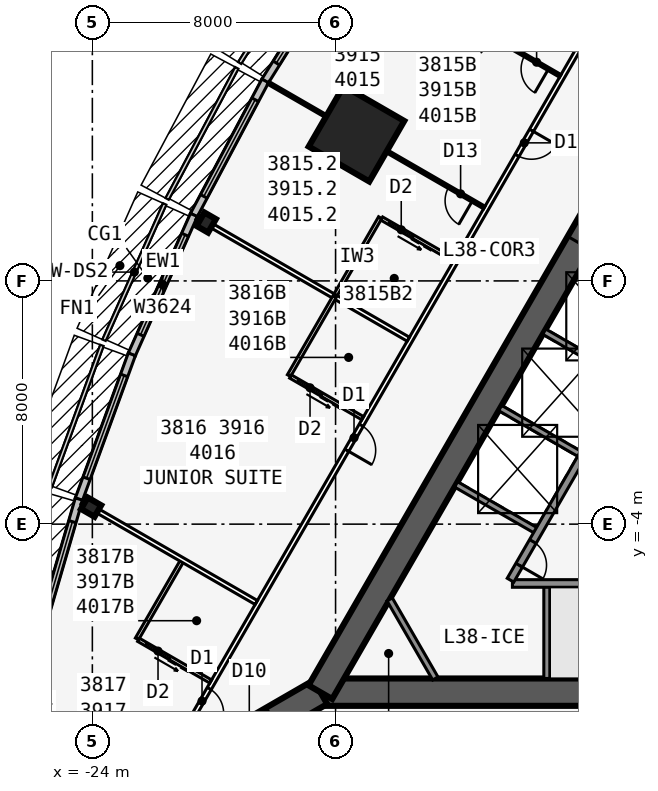
"""IFC4 building model, lengths in metres.
Left out: names, types, materials, properties, quantities, classifications, styles, units other than length and angle.
Written with IfcOpenShell. Run it as: python <this file> out.ifc"""

import sys

from ifc_helpers import new_model, si_unit, direction, frame, frame_2d, origin, origin_2d, place, context, subcontext, project, spatial, rectangle, i_section, extrude, element, fill, save


model = new_model("IFC4")
c1 = context("Model", 3, precision=1e-05, world=origin(), true_north=direction((0.0, 1.0)))
c2 = subcontext(c1, "Body", "Model", "MODEL_VIEW")
j1 = project(units=[si_unit("LENGTHUNIT", "METRE"), si_unit("PLANEANGLEUNIT", "RADIAN")], contexts=[c1])
p1 = place(None, origin())
s1 = spatial("IfcSite", under=j1, at=p1, CompositionType="ELEMENT")
p2 = place(p1, origin())
s2 = spatial("IfcBuilding", under=s1, at=p2, CompositionType="ELEMENT")
p3 = place(p2, frame((0.0, 0.0, 145.3)))
s3 = spatial("IfcBuildingStorey", under=s2, at=p3, CompositionType="ELEMENT", Elevation=145.3)
p4 = place(p3, frame((-16.5, -9.526, 0.0), z_axis=(0.0, 0.0, 1.0), x_axis=(1.0, 0.0, 0.0)))
e1 = element("IfcWall", 1, at=p4, inside=s3, PredefinedType="SHEAR", context=c2, shape_type="SweptSolid", body=[
    extrude(rectangle(XDim=33.0, YDim=0.9, at=frame_2d((16.5, 0.0))), origin(), (0.0, 0.0, 1.0), 3.4),
])
p5 = place(p4, frame((14.05, 0.0, 0.0)))
e2 = element("IfcOpeningElement", 2, at=p5, cuts=e1, PredefinedType="OPENING", context=c2, shape_type="SweptSolid", body=[
    extrude(rectangle(XDim=1.8, YDim=2.13, at=frame_2d((0.9, 1.065))), frame((0.0, 0.46, 0.0), z_axis=(0.0, -1.0, 0.0), x_axis=(1.0, 0.0, 0.0)), (0.0, 0.0, 1.0), 0.92),
])
p6 = place(p3, frame((-10.183, -5.951, 0.0), z_axis=(0.0, 0.0, 1.0), x_axis=(1.0, 0.0, 0.0)))
e3 = element("IfcWall", 3, at=p6, inside=s3, PredefinedType="SOLIDWALL", context=c2, shape_type="SweptSolid", body=[
    extrude(rectangle(XDim=7.633, YDim=0.25, at=frame_2d((3.816, 0.0))), origin(), (0.0, 0.0, 1.0), 3.235),
])
p7 = place(p3, frame((-9.05, -5.951, 0.0), z_axis=(0.0, 0.0, 1.0), x_axis=(0.0, -1.0, 0.0)))
e4 = element("IfcWall", 4, at=p7, inside=s3, PredefinedType="SOLIDWALL", context=c2, shape_type="SweptSolid", body=[
    extrude(rectangle(XDim=3.125, YDim=0.2, at=frame_2d((1.562, 0.0))), origin(), (0.0, 0.0, 1.0), 3.235),
])
p8 = place(p3, frame((0.0, 19.052, 0.0), z_axis=(0.0, 0.0, 1.0), x_axis=(-0.499999749417, -0.866025548458, 0.0)))
e5 = element("IfcWall", 5, at=p8, inside=s3, PredefinedType="SHEAR", context=c2, shape_type="SweptSolid", body=[
    extrude(rectangle(XDim=33.0, YDim=0.9, at=frame_2d((16.5, 0.0))), origin(), (0.0, 0.0, 1.0), 3.4),
])
p9 = place(p8, frame((14.15, 0.0, 0.0)))
e6 = element("IfcOpeningElement", 6, at=p9, cuts=e5, PredefinedType="OPENING", context=c2, shape_type="SweptSolid", body=[
    extrude(rectangle(XDim=1.8, YDim=2.13, at=frame_2d((0.9, 1.065))), frame((0.0, 0.46, 0.0), z_axis=(0.0, -1.0, 0.0), x_axis=(1.0, 0.0, 0.0)), (0.0, 0.0, 1.0), 0.92),
])
p10 = place(p8, frame((12.6, 0.0, 0.0)))
e7 = element("IfcOpeningElement", 7, at=p10, cuts=e5, PredefinedType="OPENING", context=c2, shape_type="SweptSolid", body=[
    extrude(rectangle(XDim=1.0, YDim=2.13, at=frame_2d((0.5, 1.065))), frame((0.0, 0.46, 0.0), z_axis=(0.0, -1.0, 0.0), x_axis=(1.0, 0.0, 0.0)), (0.0, 0.0, 1.0), 0.92),
])
p11 = place(p3, frame((-4.929, 3.365, 0.0), z_axis=(0.0, 0.0, 1.0), x_axis=(-0.499991433582, -0.866030349552, 0.0)))
e8 = element("IfcWall", 8, at=p11, inside=s3, PredefinedType="SOLIDWALL", context=c2, shape_type="SweptSolid", body=[
    extrude(rectangle(XDim=10.633, YDim=0.25, at=frame_2d((5.316, 0.0))), origin(), (0.0, 0.0, 1.0), 3.235),
])
p12 = place(p11, frame((9.164, 0.0, 0.0)))
e9 = element("IfcOpeningElement", 9, at=p12, cuts=e8, PredefinedType="OPENING", context=c2, shape_type="SweptSolid", body=[
    extrude(rectangle(XDim=0.9, YDim=2.13, at=frame_2d((0.45, 1.065))), frame((0.0, 0.135, 0.0), z_axis=(0.0, -1.0, 0.0), x_axis=(1.0, 0.0, 0.0)), (0.0, 0.0, 1.0), 0.27),
])
for number, where, z_axis, x_axis in (
    (10, (-6.429, 0.767, 0.0), (0.0, 0.0, 1.0), (-0.866, 0.5, 0.0)),
    (11, (-7.879, -1.744, 0.0), (0.0, 0.0, 1.0), (-0.866, 0.5, 0.0)),
    (12, (-9.329, -4.256, 0.0), (0.0, 0.0, 1.0), (-0.866, 0.5, 0.0)),
):
    element("IfcWall", number, at=place(p3, frame(where, z_axis=z_axis, x_axis=x_axis)), inside=s3, PredefinedType="SOLIDWALL", context=c2, shape_type="SweptSolid", body=[
        extrude(rectangle(XDim=3.125, YDim=0.2, at=frame_2d((1.562, 0.0))), origin(), (0.0, 0.0, 1.0), 3.235),
    ])
p13 = place(p3, frame((-16.5, -9.526, 0.0), z_axis=(0.0, 0.0, 1.0), x_axis=(-0.866031398331, -0.499989616998, 0.0)))
e13 = element("IfcWall", 13, at=p13, inside=s3, PredefinedType="SHEAR", context=c2, shape_type="SweptSolid", body=[
    extrude(rectangle(XDim=4.746, YDim=0.9, at=frame_2d((2.373, 0.0))), origin(), (0.0, 0.0, 1.0), 3.4),
])
p14 = place(p13, frame((1.8, 0.0, 0.0)))
e14 = element("IfcOpeningElement", 14, at=p14, cuts=e13, PredefinedType="OPENING", context=c2, shape_type="SweptSolid", body=[
    extrude(rectangle(XDim=1.8, YDim=2.13, at=frame_2d((0.9, 1.065))), frame((0.0, 0.46, 0.0), z_axis=(0.0, -1.0, 0.0), x_axis=(1.0, 0.0, 0.0)), (0.0, 0.0, 1.0), 0.92),
])
for number, where, z_axis, x_axis in (
    (15, (-20.254, 5.92, 0.0), (0.0, 0.0, 1.0), (-0.866, 0.5, 0.0)),
    (16, (-24.041, -3.44, 0.0), (0.0, 0.0, 1.0), (-0.5, -0.866, 0.0)),
):
    element("IfcColumn", number, at=place(p3, frame(where, z_axis=z_axis, x_axis=x_axis)), inside=s3, PredefinedType="COLUMN", context=c2, shape_type="SweptSolid", body=[
        extrude(i_section(OverallWidth=0.437, OverallDepth=0.513, WebThickness=0.061, FlangeThickness=0.097, at=origin_2d()), origin(), (0.0, 0.0, 1.0), 3.4),
    ])
p15 = place(p3, frame((-15.312, 8.84, 0.0), z_axis=(0.0, 0.0, 1.0), x_axis=(-0.866025403784, 0.5, 0.0)))
e17 = element("IfcColumn", 17, at=p15, inside=s3, PredefinedType="COLUMN", context=c2, shape_type="SweptSolid", body=[
    extrude(rectangle(XDim=2.3, YDim=2.3, at=origin_2d()), origin(), (0.0, 0.0, 1.0), 3.4),
])
p16 = place(p3, frame((-15.667, 14.814, 0.0), z_axis=(0.0, 0.0, 1.0), x_axis=(-0.529990167382, -0.84800378683, 0.0)))
e18 = element("IfcWall", 18, at=p16, inside=s3, PredefinedType="STANDARD", context=c2, shape_type="SweptSolid", body=[
    extrude(rectangle(XDim=5.003, YDim=0.25, at=frame_2d((2.501, 0.0))), origin(), (0.0, 0.0, 1.0), 3.235),
])
p17 = place(p16, frame((0.701, 0.0, 0.45)))
e19 = element("IfcOpeningElement", 19, at=p17, cuts=e18, PredefinedType="OPENING", context=c2, shape_type="SweptSolid", body=[
    extrude(rectangle(XDim=3.6, YDim=2.4, at=frame_2d((1.8, 1.2))), frame((0.0, 0.135, 0.0), z_axis=(0.0, -1.0, 0.0), x_axis=(1.0, 0.0, 0.0)), (0.0, 0.0, 1.0), 0.27),
])
p18 = place(p3, frame((-18.314, 10.579, 0.0), z_axis=(0.0, 0.0, 1.0), x_axis=(-0.469404966864, -0.882982999317, 0.0)))
e20 = element("IfcWall", 20, at=p18, inside=s3, PredefinedType="STANDARD", context=c2, shape_type="SweptSolid", body=[
    extrude(rectangle(XDim=5.003, YDim=0.25, at=frame_2d((2.501, 0.0))), origin(), (0.0, 0.0, 1.0), 3.235),
])
p19 = place(p18, frame((0.701, 0.0, 0.45)))
e21 = element("IfcOpeningElement", 21, at=p19, cuts=e20, PredefinedType="OPENING", context=c2, shape_type="SweptSolid", body=[
    extrude(rectangle(XDim=3.6, YDim=2.4, at=frame_2d((1.8, 1.2))), frame((0.0, 0.135, 0.0), z_axis=(0.0, -1.0, 0.0), x_axis=(1.0, 0.0, 0.0)), (0.0, 0.0, 1.0), 0.27),
])
p20 = place(p3, frame((-20.659, 6.169, 0.0), z_axis=(0.0, 0.0, 1.0), x_axis=(-0.406832200364, -0.913502906808, 0.0)))
e22 = element("IfcWall", 22, at=p20, inside=s3, PredefinedType="STANDARD", context=c2, shape_type="SweptSolid", body=[
    extrude(rectangle(XDim=5.028, YDim=0.25, at=frame_2d((2.514, 0.0))), origin(), (0.0, 0.0, 1.0), 3.235),
])
p21 = place(p20, frame((0.714, 0.0, 0.45)))
e23 = element("IfcOpeningElement", 23, at=p21, cuts=e22, PredefinedType="OPENING", context=c2, shape_type="SweptSolid", body=[
    extrude(rectangle(XDim=3.6, YDim=2.4, at=frame_2d((1.8, 1.2))), frame((0.0, 0.135, 0.0), z_axis=(0.0, -1.0, 0.0), x_axis=(1.0, 0.0, 0.0)), (0.0, 0.0, 1.0), 0.27),
])
p22 = place(p3, frame((-22.701, 1.584, 0.0), z_axis=(0.0, 0.0, 1.0), x_axis=(-0.343225593282, -0.939252996863, 0.0)))
e24 = element("IfcWall", 24, at=p22, inside=s3, PredefinedType="STANDARD", context=c2, shape_type="SweptSolid", body=[
    extrude(rectangle(XDim=5.076, YDim=0.25, at=frame_2d((2.538, 0.0))), origin(), (0.0, 0.0, 1.0), 3.235),
])
p23 = place(p22, frame((0.738, 0.0, 0.45)))
e25 = element("IfcOpeningElement", 25, at=p23, cuts=e24, PredefinedType="OPENING", context=c2, shape_type="SweptSolid", body=[
    extrude(rectangle(XDim=3.6, YDim=2.4, at=frame_2d((1.8, 1.2))), frame((0.0, 0.135, 0.0), z_axis=(0.0, -1.0, 0.0), x_axis=(1.0, 0.0, 0.0)), (0.0, 0.0, 1.0), 0.27),
])
p24 = place(p3, frame((-24.441, -3.175, 0.0), z_axis=(0.0, 0.0, 1.0), x_axis=(-0.279528287117, -0.960137457191, 0.0)))
e26 = element("IfcWall", 26, at=p24, inside=s3, PredefinedType="STANDARD", context=c2, shape_type="SweptSolid", body=[
    extrude(rectangle(XDim=5.148, YDim=0.25, at=frame_2d((2.574, 0.0))), origin(), (0.0, 0.0, 1.0), 3.235),
])
p25 = place(p24, frame((0.774, 0.0, 0.45)))
e27 = element("IfcOpeningElement", 27, at=p25, cuts=e26, PredefinedType="OPENING", context=c2, shape_type="SweptSolid", body=[
    extrude(rectangle(XDim=3.6, YDim=2.4, at=frame_2d((1.8, 1.2))), frame((0.0, 0.135, 0.0), z_axis=(0.0, -1.0, 0.0), x_axis=(1.0, 0.0, 0.0)), (0.0, 0.0, 1.0), 0.27),
])
p26 = place(p3, frame((-0.5, 24.636, 0.0), z_axis=(0.0, 0.0, 1.0), x_axis=(-0.500001915564, -0.86602429783, 0.0)))
e28 = element("IfcWall", 28, at=p26, inside=s3, PredefinedType="PARTITIONING", context=c2, shape_type="SweptSolid", body=[
    extrude(rectangle(XDim=42.172, YDim=0.15, at=frame_2d((21.086, 0.0))), origin(), (0.0, 0.0, 1.0), 3.235),
])
p27 = place(p26, frame((1.911, 0.0, 0.0)))
e29 = element("IfcOpeningElement", 29, at=p27, cuts=e28, PredefinedType="OPENING", context=c2, shape_type="SweptSolid", body=[
    extrude(rectangle(XDim=0.95, YDim=2.13, at=frame_2d((0.475, 1.065))), frame((0.0, 0.085, 0.0), z_axis=(0.0, -1.0, 0.0), x_axis=(1.0, 0.0, 0.0)), (0.0, 0.0, 1.0), 0.17),
])
p28 = place(p26, frame((9.311, 0.0, 0.0)))
e30 = element("IfcOpeningElement", 30, at=p28, cuts=e28, PredefinedType="OPENING", context=c2, shape_type="SweptSolid", body=[
    extrude(rectangle(XDim=0.95, YDim=2.13, at=frame_2d((0.475, 1.065))), frame((0.0, 0.085, 0.0), z_axis=(0.0, -1.0, 0.0), x_axis=(1.0, 0.0, 0.0)), (0.0, 0.0, 1.0), 0.17),
])
p29 = place(p26, frame((18.111, 0.0, 0.0)))
e31 = element("IfcOpeningElement", 31, at=p29, cuts=e28, PredefinedType="OPENING", context=c2, shape_type="SweptSolid", body=[
    extrude(rectangle(XDim=0.95, YDim=2.13, at=frame_2d((0.475, 1.065))), frame((0.0, 0.085, 0.0), z_axis=(0.0, -1.0, 0.0), x_axis=(1.0, 0.0, 0.0)), (0.0, 0.0, 1.0), 0.17),
])
p30 = place(p26, frame((29.311, 0.0, 0.0)))
e32 = element("IfcOpeningElement", 32, at=p30, cuts=e28, PredefinedType="OPENING", context=c2, shape_type="SweptSolid", body=[
    extrude(rectangle(XDim=0.95, YDim=2.13, at=frame_2d((0.475, 1.065))), frame((0.0, 0.085, 0.0), z_axis=(0.0, -1.0, 0.0), x_axis=(1.0, 0.0, 0.0)), (0.0, 0.0, 1.0), 0.17),
])
p31 = place(p26, frame((39.311, 0.0, 0.0)))
e33 = element("IfcOpeningElement", 33, at=p31, cuts=e28, PredefinedType="OPENING", context=c2, shape_type="SweptSolid", body=[
    extrude(rectangle(XDim=0.95, YDim=2.13, at=frame_2d((0.475, 1.065))), frame((0.0, 0.085, 0.0), z_axis=(0.0, -1.0, 0.0), x_axis=(1.0, 0.0, 0.0)), (0.0, 0.0, 1.0), 0.17),
])
p32 = place(p3, frame((-8.608, 10.743, 0.0), z_axis=(0.0, 0.0, 1.0), x_axis=(-0.866041663918, 0.499971835565, 0.0)))
e34 = element("IfcWall", 34, at=p32, inside=s3, PredefinedType="PARTITIONING", context=c2, shape_type="SweptSolid", body=[
    extrude(rectangle(XDim=8.022, YDim=0.1, at=frame_2d((4.011, 0.0))), origin(), (0.0, 0.0, 1.0), 2.389),
])
p33 = place(p32, frame((0.45, 0.0, 0.0)))
e35 = element("IfcOpeningElement", 35, at=p33, cuts=e34, PredefinedType="OPENING", context=c2, shape_type="SweptSolid", body=[
    extrude(rectangle(XDim=0.9, YDim=2.13, at=frame_2d((0.45, 1.065))), frame((0.0, 0.06, 0.0), z_axis=(0.0, -1.0, 0.0), x_axis=(1.0, 0.0, 0.0)), (0.0, 0.0, 1.0), 0.12),
])
p34 = place(p3, frame((-11.108, 6.413, 0.0), z_axis=(0.0, 0.0, 1.0), x_axis=(-0.866026407964, 0.499998260706, 0.0)))
e36 = element("IfcWall", 36, at=p34, inside=s3, PredefinedType="PARTITIONING", context=c2, shape_type="SweptSolid", body=[
    extrude(rectangle(XDim=8.199, YDim=0.1, at=frame_2d((4.099, 0.0))), origin(), (0.0, 0.0, 1.0), 2.389),
])
p35 = place(p34, frame((0.45, 0.0, 0.0)))
e37 = element("IfcOpeningElement", 37, at=p35, cuts=e36, PredefinedType="OPENING", context=c2, shape_type="SweptSolid", body=[
    extrude(rectangle(XDim=0.9, YDim=2.13, at=frame_2d((0.45, 1.065))), frame((0.0, 0.06, 0.0), z_axis=(0.0, -1.0, 0.0), x_axis=(1.0, 0.0, 0.0)), (0.0, 0.0, 1.0), 0.12),
])
p36 = place(p3, frame((-13.608, 2.083, 0.0), z_axis=(0.0, 0.0, 1.0), x_axis=(-0.866028486751, 0.499994660107, 0.0)))
e38 = element("IfcWall", 38, at=p36, inside=s3, PredefinedType="PARTITIONING", context=c2, shape_type="SweptSolid", body=[
    extrude(rectangle(XDim=8.022, YDim=0.15, at=frame_2d((4.011, 0.0))), origin(), (0.0, 0.0, 1.0), 2.389),
])
p37 = place(p3, frame((-18.608, -6.577, 0.0), z_axis=(0.0, 0.0, 1.0), x_axis=(-0.866031967744, 0.499988630717, 0.0)))
e39 = element("IfcWall", 39, at=p37, inside=s3, PredefinedType="PARTITIONING", context=c2, shape_type="SweptSolid", body=[
    extrude(rectangle(XDim=6.616, YDim=0.15, at=frame_2d((3.308, 0.0))), origin(), (0.0, 0.0, 1.0), 2.389),
])
p38 = place(p3, frame((-14.533, 6.081, 0.0), z_axis=(0.0, 0.0, 1.0), x_axis=(-0.499990139034, -0.866031096941, 0.0)))
e40 = element("IfcWall", 40, at=p38, inside=s3, PredefinedType="PLUMBINGWALL", context=c2, shape_type="SweptSolid", body=[
    extrude(rectangle(XDim=3.0, YDim=0.12, at=frame_2d((1.5, 0.0))), origin(), (0.0, 0.0, 1.0), 3.235),
])
p39 = place(p3, frame((-12.108, 4.681, 0.0), z_axis=(0.0, 0.0, 1.0), x_axis=(-0.866035715982, 0.499982138324, 0.0)))
e41 = element("IfcWall", 41, at=p39, inside=s3, PredefinedType="PLUMBINGWALL", context=c2, shape_type="SweptSolid", body=[
    extrude(rectangle(XDim=2.74, YDim=0.12, at=frame_2d((1.37, 0.0))), origin(), (0.0, 0.0, 1.0), 3.235),
])
p40 = place(p39, frame((1.55, 0.0, 0.0)))
e42 = element("IfcOpeningElement", 42, at=p40, cuts=e41, PredefinedType="OPENING", context=c2, shape_type="SweptSolid", body=[
    extrude(rectangle(XDim=0.9, YDim=2.13, at=frame_2d((0.45, 1.065))), frame((0.0, 0.07, 0.0), z_axis=(0.0, -1.0, 0.0), x_axis=(1.0, 0.0, 0.0)), (0.0, 0.0, 1.0), 0.14),
])
p41 = place(p3, frame((-16.033, 3.483, 0.0), z_axis=(0.0, 0.0, 1.0), x_axis=(-0.50002537861, -0.866010750942, 0.0)))
e43 = element("IfcWall", 43, at=p41, inside=s3, PredefinedType="PLUMBINGWALL", context=c2, shape_type="SweptSolid", body=[
    extrude(rectangle(XDim=3.0, YDim=0.12, at=frame_2d((1.5, 0.0))), origin(), (0.0, 0.0, 1.0), 3.235),
])
p42 = place(p3, frame((-15.108, -0.515, 0.0), z_axis=(0.0, 0.0, 1.0), x_axis=(-0.865997131366, 0.500048966069, 0.0)))
e44 = element("IfcWall", 44, at=p42, inside=s3, PredefinedType="PLUMBINGWALL", context=c2, shape_type="SweptSolid", body=[
    extrude(rectangle(XDim=2.74, YDim=0.12, at=frame_2d((1.37, 0.0))), origin(), (0.0, 0.0, 1.0), 3.235),
])
p43 = place(p42, frame((1.55, 0.0, 0.0)))
e45 = element("IfcOpeningElement", 45, at=p43, cuts=e44, PredefinedType="OPENING", context=c2, shape_type="SweptSolid", body=[
    extrude(rectangle(XDim=0.9, YDim=2.13, at=frame_2d((0.45, 1.065))), frame((0.0, 0.07, 0.0), z_axis=(0.0, -1.0, 0.0), x_axis=(1.0, 0.0, 0.0)), (0.0, 0.0, 1.0), 0.14),
])
p44 = place(p3, frame((-21.033, -5.177, 0.0), z_axis=(0.0, 0.0, 1.0), x_axis=(-0.499990139034, -0.866031096941, 0.0)))
e46 = element("IfcWall", 46, at=p44, inside=s3, PredefinedType="PLUMBINGWALL", context=c2, shape_type="SweptSolid", body=[
    extrude(rectangle(XDim=3.0, YDim=0.12, at=frame_2d((1.5, 0.0))), origin(), (0.0, 0.0, 1.0), 3.235),
])
p45 = place(p3, frame((-20.108, -9.175, 0.0), z_axis=(0.0, 0.0, 1.0), x_axis=(-0.866035715982, 0.499982138324, 0.0)))
e47 = element("IfcWall", 47, at=p45, inside=s3, PredefinedType="PLUMBINGWALL", context=c2, shape_type="SweptSolid", body=[
    extrude(rectangle(XDim=2.74, YDim=0.12, at=frame_2d((1.37, 0.0))), origin(), (0.0, 0.0, 1.0), 3.235),
])
p46 = place(p45, frame((1.55, 0.0, 0.0)))
e48 = element("IfcOpeningElement", 48, at=p46, cuts=e47, PredefinedType="OPENING", context=c2, shape_type="SweptSolid", body=[
    extrude(rectangle(XDim=0.9, YDim=2.13, at=frame_2d((0.45, 1.065))), frame((0.0, 0.07, 0.0), z_axis=(0.0, -1.0, 0.0), x_axis=(1.0, 0.0, 0.0)), (0.0, 0.0, 1.0), 0.14),
])
p47 = place(p3, frame((-12.719, -9.076, 0.0), z_axis=(0.0, 0.0, 1.0), x_axis=(-0.499952404951, 0.866052881055, 0.0)))
e49 = element("IfcWall", 49, at=p47, inside=s3, PredefinedType="SOLIDWALL", context=c2, shape_type="SweptSolid", body=[
    extrude(rectangle(XDim=3.002, YDim=0.2, at=frame_2d((1.501, 0.0))), origin(), (0.0, 0.0, 1.0), 3.235),
])
p48 = place(p17, origin())
e50 = element("IfcWindow", 50, at=p48, inside=s3, PartitioningType="SINGLE_PANEL", PredefinedType="WINDOW", context=c2, shape_type="SweptSolid", body=[
    extrude(rectangle(XDim=3.6, YDim=2.4, at=frame_2d((1.8, 1.2))), frame((0.0, 0.03, 0.0), z_axis=(0.0, -1.0, 0.0), x_axis=(1.0, 0.0, 0.0)), (0.0, 0.0, 1.0), 0.06),
])
fill(e19, e50)
p49 = place(p19, origin())
e51 = element("IfcWindow", 51, at=p49, inside=s3, PartitioningType="SINGLE_PANEL", PredefinedType="WINDOW", context=c2, shape_type="SweptSolid", body=[
    extrude(rectangle(XDim=3.6, YDim=2.4, at=frame_2d((1.8, 1.2))), frame((0.0, 0.03, 0.0), z_axis=(0.0, -1.0, 0.0), x_axis=(1.0, 0.0, 0.0)), (0.0, 0.0, 1.0), 0.06),
])
fill(e21, e51)
p50 = place(p21, origin())
e52 = element("IfcWindow", 52, at=p50, inside=s3, PartitioningType="SINGLE_PANEL", PredefinedType="WINDOW", context=c2, shape_type="SweptSolid", body=[
    extrude(rectangle(XDim=3.6, YDim=2.4, at=frame_2d((1.8, 1.2))), frame((0.0, 0.03, 0.0), z_axis=(0.0, -1.0, 0.0), x_axis=(1.0, 0.0, 0.0)), (0.0, 0.0, 1.0), 0.06),
])
fill(e23, e52)
p51 = place(p23, origin())
e53 = element("IfcWindow", 53, at=p51, inside=s3, PartitioningType="SINGLE_PANEL", PredefinedType="WINDOW", context=c2, shape_type="SweptSolid", body=[
    extrude(rectangle(XDim=3.6, YDim=2.4, at=frame_2d((1.8, 1.2))), frame((0.0, 0.03, 0.0), z_axis=(0.0, -1.0, 0.0), x_axis=(1.0, 0.0, 0.0)), (0.0, 0.0, 1.0), 0.06),
])
fill(e25, e53)
p52 = place(p25, origin())
e54 = element("IfcWindow", 54, at=p52, inside=s3, PartitioningType="SINGLE_PANEL", PredefinedType="WINDOW", context=c2, shape_type="SweptSolid", body=[
    extrude(rectangle(XDim=3.6, YDim=2.4, at=frame_2d((1.8, 1.2))), frame((0.0, 0.03, 0.0), z_axis=(0.0, -1.0, 0.0), x_axis=(1.0, 0.0, 0.0)), (0.0, 0.0, 1.0), 0.06),
])
fill(e27, e54)
p53 = place(p33, origin())
e55 = element("IfcDoor", 55, at=p53, inside=s3, OperationType="SINGLE_SWING_LEFT", PredefinedType="DOOR", context=c2, shape_type="SweptSolid", body=[
    extrude(rectangle(XDim=0.9, YDim=2.13, at=frame_2d((0.45, 1.065))), frame((0.0, 0.025, 0.0), z_axis=(0.0, -1.0, 0.0), x_axis=(1.0, 0.0, 0.0)), (0.0, 0.0, 1.0), 0.05),
])
fill(e35, e55)
p54 = place(p35, origin())
e56 = element("IfcDoor", 56, at=p54, inside=s3, OperationType="SINGLE_SWING_LEFT", PredefinedType="DOOR", context=c2, shape_type="SweptSolid", body=[
    extrude(rectangle(XDim=0.9, YDim=2.13, at=frame_2d((0.45, 1.065))), frame((0.0, 0.025, 0.0), z_axis=(0.0, -1.0, 0.0), x_axis=(1.0, 0.0, 0.0)), (0.0, 0.0, 1.0), 0.05),
])
fill(e37, e56)
p55 = place(p29, origin())
e57 = element("IfcDoor", 57, at=p55, inside=s3, OperationType="SINGLE_SWING_LEFT", PredefinedType="DOOR", context=c2, shape_type="SweptSolid", body=[
    extrude(rectangle(XDim=0.95, YDim=2.13, at=frame_2d((0.475, 1.065))), frame((0.0, 0.025, 0.0), z_axis=(0.0, -1.0, 0.0), x_axis=(1.0, 0.0, 0.0)), (0.0, 0.0, 1.0), 0.05),
])
fill(e31, e57)
p56 = place(p40, origin())
e58 = element("IfcDoor", 58, at=p56, inside=s3, OperationType="SLIDING_TO_LEFT", PredefinedType="DOOR", context=c2, shape_type="SweptSolid", body=[
    extrude(rectangle(XDim=0.9, YDim=2.13, at=frame_2d((0.45, 1.065))), frame((0.0, 0.025, 0.0), z_axis=(0.0, -1.0, 0.0), x_axis=(1.0, 0.0, 0.0)), (0.0, 0.0, 1.0), 0.05),
])
fill(e42, e58)
p57 = place(p43, origin())
e59 = element("IfcDoor", 59, at=p57, inside=s3, OperationType="SLIDING_TO_LEFT", PredefinedType="DOOR", context=c2, shape_type="SweptSolid", body=[
    extrude(rectangle(XDim=0.9, YDim=2.13, at=frame_2d((0.45, 1.065))), frame((0.0, 0.025, 0.0), z_axis=(0.0, -1.0, 0.0), x_axis=(1.0, 0.0, 0.0)), (0.0, 0.0, 1.0), 0.05),
])
fill(e45, e59)
p58 = place(p30, origin())
e60 = element("IfcDoor", 60, at=p58, inside=s3, OperationType="SINGLE_SWING_RIGHT", PredefinedType="DOOR", context=c2, shape_type="SweptSolid", body=[
    extrude(rectangle(XDim=0.95, YDim=2.13, at=frame_2d((0.475, 1.065))), frame((0.0, 0.025, 0.0), z_axis=(0.0, -1.0, 0.0), x_axis=(1.0, 0.0, 0.0)), (0.0, 0.0, 1.0), 0.05),
])
fill(e32, e60)
p59 = place(p46, origin())
e61 = element("IfcDoor", 61, at=p59, inside=s3, OperationType="SLIDING_TO_LEFT", PredefinedType="DOOR", context=c2, shape_type="SweptSolid", body=[
    extrude(rectangle(XDim=0.9, YDim=2.13, at=frame_2d((0.45, 1.065))), frame((0.0, 0.025, 0.0), z_axis=(0.0, -1.0, 0.0), x_axis=(1.0, 0.0, 0.0)), (0.0, 0.0, 1.0), 0.05),
])
fill(e48, e61)
p60 = place(p31, origin())
e62 = element("IfcDoor", 62, at=p60, inside=s3, OperationType="SINGLE_SWING_RIGHT", PredefinedType="DOOR", context=c2, shape_type="SweptSolid", body=[
    extrude(rectangle(XDim=0.95, YDim=2.13, at=frame_2d((0.475, 1.065))), frame((0.0, 0.025, 0.0), z_axis=(0.0, -1.0, 0.0), x_axis=(1.0, 0.0, 0.0)), (0.0, 0.0, 1.0), 0.05),
])
fill(e33, e62)
p61 = place(p12, origin())
e63 = element("IfcDoor", 63, at=p61, inside=s3, OperationType="SINGLE_SWING_RIGHT", PredefinedType="DOOR", context=c2, shape_type="SweptSolid", body=[
    extrude(rectangle(XDim=0.9, YDim=2.13, at=frame_2d((0.45, 1.065))), frame((0.0, 0.025, 0.0), z_axis=(0.0, -1.0, 0.0), x_axis=(1.0, 0.0, 0.0)), (0.0, 0.0, 1.0), 0.05),
])
fill(e9, e63)
save(model, sys.argv[1])
